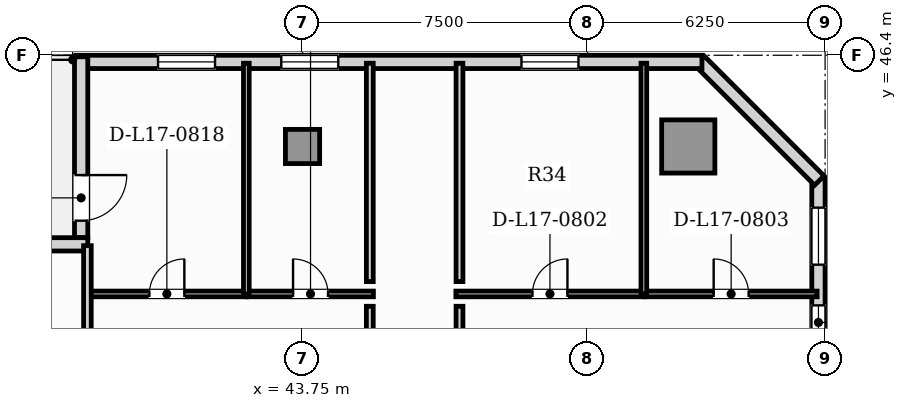
"""IFC4 building model, lengths in metres.
Left out: names, types, materials, properties, quantities, classifications, styles, units other than length and angle.
Written with IfcOpenShell. Run it as: python <this file> out.ifc"""

import sys

from ifc_helpers import new_model, si_unit, direction, frame, frame_2d, origin, origin_2d, place, context, subcontext, project, spatial, rectangle, hollow_rectangle, extrude, element, fill, save


model = new_model("IFC4")
c1 = context("Model", 3, precision=1e-05, world=origin(), true_north=direction((0.0, 1.0)))
c2 = subcontext(c1, "Body", "Model", "MODEL_VIEW")
j1 = project(units=[si_unit("LENGTHUNIT", "METRE"), si_unit("PLANEANGLEUNIT", "RADIAN")], contexts=[c1])
p1 = place(None, origin())
s1 = spatial("IfcSite", under=j1, at=p1, CompositionType="ELEMENT")
p2 = place(p1, origin())
s2 = spatial("IfcBuilding", under=s1, at=p2, CompositionType="ELEMENT")
p3 = place(p2, frame((0.0, 0.0, 72.15)))
s3 = spatial("IfcBuildingStorey", under=s2, at=p3, CompositionType="ELEMENT", Elevation=72.15)
p4 = place(p3, frame((53.9, 44.0, 0.0), z_axis=(0.0, 0.0, 1.0), x_axis=(1.0, 0.0, 0.0)))
e1 = element("IfcColumn", 1, at=p4, inside=s3, PredefinedType="USERDEFINED", context=c2, shape_type="SweptSolid", body=[
    extrude(hollow_rectangle(XDim=1.4, YDim=1.4, WallThickness=0.08, at=origin_2d()), origin(), (0.0, 0.0, 1.0), 3.85),
])
p5 = place(p3, frame((43.75, 44.0, 0.0), z_axis=(0.0, 0.0, 1.0), x_axis=(1.0, 0.0, 0.0)))
e2 = element("IfcColumn", 2, at=p5, inside=s3, PredefinedType="COLUMN", context=c2, shape_type="SweptSolid", body=[
    extrude(rectangle(XDim=0.9, YDim=0.9, at=origin_2d()), origin(), (0.0, 0.0, 1.0), 3.85),
])
p6 = place(p3, frame((57.325, 3.24, 0.0), z_axis=(0.0, 0.0, 1.0), x_axis=(0.0, 1.0, 0.0)))
e3 = element("IfcWall", 3, at=p6, inside=s3, PredefinedType="SOLIDWALL", context=c2, shape_type="SweptSolid", body=[
    extrude(rectangle(XDim=39.92, YDim=0.35, at=frame_2d((19.96, 0.0))), origin(), (0.0, 0.0, 1.0), 3.57),
])
p7 = place(p6, frame((35.68, 0.0, 0.95)))
e4 = element("IfcOpeningElement", 4, at=p7, cuts=e3, PredefinedType="OPENING", context=c2, shape_type="SweptSolid", body=[
    extrude(rectangle(XDim=0.9, YDim=1.5, at=frame_2d((0.45, 0.75))), frame((0.0, 0.185, 0.0), z_axis=(0.0, -1.0, 0.0), x_axis=(1.0, 0.0, 0.0)), (0.0, 0.0, 1.0), 0.37),
])
p8 = place(p6, frame((11.929, 0.0, 0.9)))
e5 = element("IfcOpeningElement", 5, at=p8, cuts=e3, PredefinedType="OPENING", context=c2, shape_type="SweptSolid", body=[
    extrude(rectangle(XDim=1.5, YDim=1.95, at=frame_2d((0.75, 0.975))), frame((0.0, 0.185, 0.0), z_axis=(0.0, -1.0, 0.0), x_axis=(1.0, 0.0, 0.0)), (0.0, 0.0, 1.0), 0.37),
])
p9 = place(p6, frame((24.354, 0.0, 0.9)))
e6 = element("IfcOpeningElement", 6, at=p9, cuts=e3, PredefinedType="OPENING", context=c2, shape_type="SweptSolid", body=[
    extrude(rectangle(XDim=1.5, YDim=1.95, at=frame_2d((0.75, 0.975))), frame((0.0, 0.185, 0.0), z_axis=(0.0, -1.0, 0.0), x_axis=(1.0, 0.0, 0.0)), (0.0, 0.0, 1.0), 0.37),
])
p10 = place(p6, frame((37.65, 0.0, 0.9)))
e7 = element("IfcOpeningElement", 7, at=p10, cuts=e3, PredefinedType="OPENING", context=c2, shape_type="SweptSolid", body=[
    extrude(rectangle(XDim=1.5, YDim=1.95, at=frame_2d((0.75, 0.975))), frame((0.0, 0.185, 0.0), z_axis=(0.0, -1.0, 0.0), x_axis=(1.0, 0.0, 0.0)), (0.0, 0.0, 1.0), 0.37),
])
p11 = place(p3, frame((57.348, 43.104, 0.0), z_axis=(0.0, 0.0, 1.0), x_axis=(-0.707079321262, 0.707134240044, 0.0)))
e8 = element("IfcWall", 8, at=p11, inside=s3, PredefinedType="SOLIDWALL", context=c2, shape_type="SweptSolid", body=[
    extrude(rectangle(XDim=4.446, YDim=0.35, at=frame_2d((2.223, 0.0))), origin(), (0.0, 0.0, 1.0), 3.57),
])
p12 = place(p3, frame((54.26, 46.225, 0.0), z_axis=(0.0, 0.0, 1.0), x_axis=(-1.0, 0.0, 0.0)))
e9 = element("IfcWall", 9, at=p12, inside=s3, PredefinedType="SOLIDWALL", context=c2, shape_type="SweptSolid", body=[
    extrude(rectangle(XDim=16.47, YDim=0.35, at=frame_2d((8.235, 0.0))), origin(), (0.0, 0.0, 1.0), 3.57),
])
p13 = place(p12, frame((3.25, 0.0, 0.9)))
e10 = element("IfcOpeningElement", 10, at=p13, cuts=e9, PredefinedType="OPENING", context=c2, shape_type="SweptSolid", body=[
    extrude(rectangle(XDim=1.5, YDim=1.95, at=frame_2d((0.75, 0.975))), frame((0.0, 0.185, 0.0), z_axis=(0.0, -1.0, 0.0), x_axis=(1.0, 0.0, 0.0)), (0.0, 0.0, 1.0), 0.37),
])
p14 = place(p12, frame((12.812, 0.0, 0.9)))
e11 = element("IfcOpeningElement", 11, at=p14, cuts=e9, PredefinedType="OPENING", context=c2, shape_type="SweptSolid", body=[
    extrude(rectangle(XDim=1.5, YDim=1.95, at=frame_2d((0.75, 0.975))), frame((0.0, 0.185, 0.0), z_axis=(0.0, -1.0, 0.0), x_axis=(1.0, 0.0, 0.0)), (0.0, 0.0, 1.0), 0.37),
])
p15 = place(p12, frame((9.569, 0.0, 0.9)))
e12 = element("IfcOpeningElement", 12, at=p15, cuts=e9, PredefinedType="OPENING", context=c2, shape_type="SweptSolid", body=[
    extrude(rectangle(XDim=1.5, YDim=1.95, at=frame_2d((0.75, 0.975))), frame((0.0, 0.185, 0.0), z_axis=(0.0, -1.0, 0.0), x_axis=(1.0, 0.0, 0.0)), (0.0, 0.0, 1.0), 0.37),
])
p16 = place(p3, frame((37.925, 46.36, 0.0), z_axis=(0.0, 0.0, 1.0), x_axis=(0.0, -1.0, 0.0)))
e13 = element("IfcWall", 13, at=p16, inside=s3, PredefinedType="SOLIDWALL", context=c2, shape_type="SweptSolid", body=[
    extrude(rectangle(XDim=4.76, YDim=0.35, at=frame_2d((2.38, 0.0))), origin(), (0.0, 0.0, 1.0), 3.57),
])
p17 = place(p16, frame((3.113, 0.0, 0.0)))
e14 = element("IfcOpeningElement", 14, at=p17, cuts=e13, PredefinedType="OPENING", context=c2, shape_type="SweptSolid", body=[
    extrude(rectangle(XDim=1.2, YDim=2.2, at=frame_2d((0.6, 1.1))), frame((0.0, 0.185, 0.0), z_axis=(0.0, -1.0, 0.0), x_axis=(1.0, 0.0, 0.0)), (0.0, 0.0, 1.0), 0.37),
])
p18 = place(p3, frame((38.1, 41.425, 0.0), z_axis=(0.0, 0.0, 1.0), x_axis=(-1.0, 0.0, 0.0)))
e15 = element("IfcWall", 15, at=p18, inside=s3, PredefinedType="SOLIDWALL", context=c2, shape_type="SweptSolid", body=[
    extrude(rectangle(XDim=18.7, YDim=0.35, at=frame_2d((9.35, 0.0))), origin(), (0.0, 0.0, 1.0), 3.57),
])
p19 = place(p18, frame((14.506, 0.0, 0.9)))
e16 = element("IfcOpeningElement", 16, at=p19, cuts=e15, PredefinedType="OPENING", context=c2, shape_type="SweptSolid", body=[
    extrude(rectangle(XDim=1.5, YDim=1.95, at=frame_2d((0.75, 0.975))), frame((0.0, 0.185, 0.0), z_axis=(0.0, -1.0, 0.0), x_axis=(1.0, 0.0, 0.0)), (0.0, 0.0, 1.0), 0.37),
])
p20 = place(p18, frame((10.514, 0.0, 0.9)))
e17 = element("IfcOpeningElement", 17, at=p20, cuts=e15, PredefinedType="OPENING", context=c2, shape_type="SweptSolid", body=[
    extrude(rectangle(XDim=1.5, YDim=1.95, at=frame_2d((0.75, 0.975))), frame((0.0, 0.185, 0.0), z_axis=(0.0, -1.0, 0.0), x_axis=(1.0, 0.0, 0.0)), (0.0, 0.0, 1.0), 0.37),
])
p21 = place(p18, frame((6.546, 0.0, 0.9)))
e18 = element("IfcOpeningElement", 18, at=p21, cuts=e15, PredefinedType="OPENING", context=c2, shape_type="SweptSolid", body=[
    extrude(rectangle(XDim=1.5, YDim=1.95, at=frame_2d((0.75, 0.975))), frame((0.0, 0.185, 0.0), z_axis=(0.0, -1.0, 0.0), x_axis=(1.0, 0.0, 0.0)), (0.0, 0.0, 1.0), 0.37),
])
p22 = place(p18, frame((2.554, 0.0, 0.9)))
e19 = element("IfcOpeningElement", 19, at=p22, cuts=e15, PredefinedType="OPENING", context=c2, shape_type="SweptSolid", body=[
    extrude(rectangle(XDim=1.5, YDim=1.95, at=frame_2d((0.75, 0.975))), frame((0.0, 0.185, 0.0), z_axis=(0.0, -1.0, 0.0), x_axis=(1.0, 0.0, 0.0)), (0.0, 0.0, 1.0), 0.37),
])
p23 = place(p3, frame((47.785, 40.12, 0.0), z_axis=(0.0, 0.0, 1.0), x_axis=(1.0, 0.0, 0.0)))
e20 = element("IfcWall", 20, at=p23, inside=s3, PredefinedType="PARTITIONING", context=c2, shape_type="SweptSolid", body=[
    extrude(rectangle(XDim=4.951, YDim=0.15, at=frame_2d((2.476, 0.0))), origin(), (0.0, 0.0, 1.0), 3.57),
])
p24 = place(p23, frame((2.016, 0.0, 0.0)))
e21 = element("IfcOpeningElement", 21, at=p24, cuts=e20, PredefinedType="OPENING", context=c2, shape_type="SweptSolid", body=[
    extrude(rectangle(XDim=0.92, YDim=2.1, at=frame_2d((0.46, 1.05))), frame((0.0, 0.085, 0.0), z_axis=(0.0, -1.0, 0.0), x_axis=(1.0, 0.0, 0.0)), (0.0, 0.0, 1.0), 0.17),
])
p25 = place(p3, frame((52.766, 40.12, 0.0), z_axis=(0.0, 0.0, 1.0), x_axis=(1.0, 0.0, 0.0)))
e22 = element("IfcWall", 22, at=p25, inside=s3, PredefinedType="PARTITIONING", context=c2, shape_type="SweptSolid", body=[
    extrude(rectangle(XDim=4.524, YDim=0.15, at=frame_2d((2.262, 0.0))), origin(), (0.0, 0.0, 1.0), 3.57),
])
p26 = place(p25, frame((1.802, 0.0, 0.0)))
e23 = element("IfcOpeningElement", 23, at=p26, cuts=e22, PredefinedType="OPENING", context=c2, shape_type="SweptSolid", body=[
    extrude(rectangle(XDim=0.92, YDim=2.1, at=frame_2d((0.46, 1.05))), frame((0.0, 0.085, 0.0), z_axis=(0.0, -1.0, 0.0), x_axis=(1.0, 0.0, 0.0)), (0.0, 0.0, 1.0), 0.17),
])
p27 = place(p3, frame((52.731, 40.115, 0.0), z_axis=(0.0, 0.0, 1.0), x_axis=(0.0, 1.0, 0.0)))
e24 = element("IfcWall", 24, at=p27, inside=s3, PredefinedType="PARTITIONING", context=c2, shape_type="SweptSolid", body=[
    extrude(rectangle(XDim=6.075, YDim=0.15, at=frame_2d((3.038, 0.0))), origin(), (0.0, 0.0, 1.0), 3.57),
])
p28 = place(p3, frame((38.085, 40.12, 0.0), z_axis=(0.0, 0.0, 1.0), x_axis=(1.0, 0.0, 0.0)))
e25 = element("IfcWall", 25, at=p28, inside=s3, PredefinedType="PARTITIONING", context=c2, shape_type="SweptSolid", body=[
    extrude(rectangle(XDim=4.191, YDim=0.15, at=frame_2d((2.096, 0.0))), origin(), (0.0, 0.0, 1.0), 3.57),
])
p29 = place(p28, frame((1.635, 0.0, 0.0)))
e26 = element("IfcOpeningElement", 26, at=p29, cuts=e25, PredefinedType="OPENING", context=c2, shape_type="SweptSolid", body=[
    extrude(rectangle(XDim=0.92, YDim=2.1, at=frame_2d((0.46, 1.05))), frame((0.0, 0.085, 0.0), z_axis=(0.0, -1.0, 0.0), x_axis=(1.0, 0.0, 0.0)), (0.0, 0.0, 1.0), 0.17),
])
p30 = place(p3, frame((42.306, 40.12, 0.0), z_axis=(0.0, 0.0, 1.0), x_axis=(1.0, 0.0, 0.0)))
e27 = element("IfcWall", 27, at=p30, inside=s3, PredefinedType="PARTITIONING", context=c2, shape_type="SweptSolid", body=[
    extrude(rectangle(XDim=3.309, YDim=0.15, at=frame_2d((1.654, 0.0))), origin(), (0.0, 0.0, 1.0), 3.57),
])
p31 = place(p30, frame((1.194, 0.0, 0.0)))
e28 = element("IfcOpeningElement", 28, at=p31, cuts=e27, PredefinedType="OPENING", context=c2, shape_type="SweptSolid", body=[
    extrude(rectangle(XDim=0.92, YDim=2.1, at=frame_2d((0.46, 1.05))), frame((0.0, 0.085, 0.0), z_axis=(0.0, -1.0, 0.0), x_axis=(1.0, 0.0, 0.0)), (0.0, 0.0, 1.0), 0.17),
])
p32 = place(p3, frame((38.09, 38.615, 0.0), z_axis=(0.0, 0.0, 1.0), x_axis=(0.0, 1.0, 0.0)))
e29 = element("IfcWall", 29, at=p32, inside=s3, PredefinedType="PARTITIONING", context=c2, shape_type="SweptSolid", body=[
    extrude(rectangle(XDim=2.775, YDim=0.2, at=frame_2d((1.387, 0.0))), origin(), (0.0, 0.0, 1.0), 3.57),
])
p33 = place(p3, frame((42.271, 40.115, 0.0), z_axis=(0.0, 0.0, 1.0), x_axis=(0.0, 1.0, 0.0)))
e30 = element("IfcWall", 30, at=p33, inside=s3, PredefinedType="PARTITIONING", context=c2, shape_type="SweptSolid", body=[
    extrude(rectangle(XDim=6.075, YDim=0.15, at=frame_2d((3.038, 0.0))), origin(), (0.0, 0.0, 1.0), 3.57),
])
p34 = place(p3, frame((47.88, 38.945, 0.0), z_axis=(0.0, 0.0, 1.0), x_axis=(0.0, 1.0, 0.0)))
e31 = element("IfcWall", 31, at=p34, inside=s3, PredefinedType="PARTITIONING", context=c2, shape_type="SweptSolid", body=[
    extrude(rectangle(XDim=0.85, YDim=0.18, at=frame_2d((0.425, 0.0))), origin(), (0.0, 0.0, 1.0), 3.57),
])
p35 = place(p3, frame((47.88, 40.445, 0.0), z_axis=(0.0, 0.0, 1.0), x_axis=(0.0, 1.0, 0.0)))
e32 = element("IfcWall", 32, at=p35, inside=s3, PredefinedType="PARTITIONING", context=c2, shape_type="SweptSolid", body=[
    extrude(rectangle(XDim=5.745, YDim=0.18, at=frame_2d((2.873, 0.0))), origin(), (0.0, 0.0, 1.0), 3.57),
])
p36 = place(p3, frame((45.52, 39.795, 0.0), z_axis=(0.0, 0.0, 1.0), x_axis=(0.0, -1.0, 0.0)))
e33 = element("IfcWall", 33, at=p36, inside=s3, PredefinedType="PARTITIONING", context=c2, shape_type="SweptSolid", body=[
    extrude(rectangle(XDim=0.85, YDim=0.18, at=frame_2d((0.425, 0.0))), origin(), (0.0, 0.0, 1.0), 3.57),
])
p37 = place(p3, frame((45.52, 46.19, 0.0), z_axis=(0.0, 0.0, 1.0), x_axis=(0.0, -1.0, 0.0)))
e34 = element("IfcWall", 34, at=p37, inside=s3, PredefinedType="PARTITIONING", context=c2, shape_type="SweptSolid", body=[
    extrude(rectangle(XDim=5.745, YDim=0.18, at=frame_2d((2.873, 0.0))), origin(), (0.0, 0.0, 1.0), 3.57),
])
p38 = place(p17, frame((1.2, 0.0, 0.0), z_axis=(0.0, 0.0, 1.0), x_axis=(-1.0, 0.0, 0.0)))
e35 = element("IfcDoor", 35, at=p38, inside=s3, OperationType="SINGLE_SWING_RIGHT", PredefinedType="DOOR", context=c2, shape_type="SweptSolid", body=[
    extrude(rectangle(XDim=1.2, YDim=2.2, at=frame_2d((0.6, 1.1))), frame((0.0, 0.025, 0.0), z_axis=(0.0, -1.0, 0.0), x_axis=(1.0, 0.0, 0.0)), (0.0, 0.0, 1.0), 0.05),
])
fill(e14, e35)
p39 = place(p7, origin())
e36 = element("IfcWindow", 36, at=p39, inside=s3, PartitioningType="SINGLE_PANEL", PredefinedType="WINDOW", context=c2, shape_type="SweptSolid", body=[
    extrude(rectangle(XDim=0.9, YDim=1.5, at=frame_2d((0.45, 0.75))), frame((0.0, 0.03, 0.0), z_axis=(0.0, -1.0, 0.0), x_axis=(1.0, 0.0, 0.0)), (0.0, 0.0, 1.0), 0.06),
])
fill(e4, e36)
p40 = place(p13, origin())
e37 = element("IfcWindow", 37, at=p40, inside=s3, PartitioningType="SINGLE_PANEL", PredefinedType="WINDOW", context=c2, shape_type="SweptSolid", body=[
    extrude(rectangle(XDim=1.5, YDim=1.95, at=frame_2d((0.75, 0.975))), frame((0.0, 0.03, 0.0), z_axis=(0.0, -1.0, 0.0), x_axis=(1.0, 0.0, 0.0)), (0.0, 0.0, 1.0), 0.06),
])
fill(e10, e37)
p41 = place(p10, origin())
e38 = element("IfcWindow", 38, at=p41, inside=s3, PartitioningType="SINGLE_PANEL", PredefinedType="WINDOW", context=c2, shape_type="SweptSolid", body=[
    extrude(rectangle(XDim=1.5, YDim=1.95, at=frame_2d((0.75, 0.975))), frame((0.0, 0.03, 0.0), z_axis=(0.0, -1.0, 0.0), x_axis=(1.0, 0.0, 0.0)), (0.0, 0.0, 1.0), 0.06),
])
fill(e7, e38)
p42 = place(p14, origin())
e39 = element("IfcWindow", 39, at=p42, inside=s3, PartitioningType="SINGLE_PANEL", PredefinedType="WINDOW", context=c2, shape_type="SweptSolid", body=[
    extrude(rectangle(XDim=1.5, YDim=1.95, at=frame_2d((0.75, 0.975))), frame((0.0, 0.03, 0.0), z_axis=(0.0, -1.0, 0.0), x_axis=(1.0, 0.0, 0.0)), (0.0, 0.0, 1.0), 0.06),
])
fill(e11, e39)
p43 = place(p15, origin())
e40 = element("IfcWindow", 40, at=p43, inside=s3, PartitioningType="SINGLE_PANEL", PredefinedType="WINDOW", context=c2, shape_type="SweptSolid", body=[
    extrude(rectangle(XDim=1.5, YDim=1.95, at=frame_2d((0.75, 0.975))), frame((0.0, 0.03, 0.0), z_axis=(0.0, -1.0, 0.0), x_axis=(1.0, 0.0, 0.0)), (0.0, 0.0, 1.0), 0.06),
])
fill(e12, e40)
p44 = place(p24, origin())
e41 = element("IfcDoor", 41, at=p44, inside=s3, OperationType="SINGLE_SWING_RIGHT", PredefinedType="DOOR", context=c2, shape_type="SweptSolid", body=[
    extrude(rectangle(XDim=0.92, YDim=2.1, at=frame_2d((0.46, 1.05))), frame((0.0, 0.025, 0.0), z_axis=(0.0, -1.0, 0.0), x_axis=(1.0, 0.0, 0.0)), (0.0, 0.0, 1.0), 0.05),
])
fill(e21, e41)
p45 = place(p26, origin())
e42 = element("IfcDoor", 42, at=p45, inside=s3, OperationType="SINGLE_SWING_LEFT", PredefinedType="DOOR", context=c2, shape_type="SweptSolid", body=[
    extrude(rectangle(XDim=0.92, YDim=2.1, at=frame_2d((0.46, 1.05))), frame((0.0, 0.025, 0.0), z_axis=(0.0, -1.0, 0.0), x_axis=(1.0, 0.0, 0.0)), (0.0, 0.0, 1.0), 0.05),
])
fill(e23, e42)
p46 = place(p29, origin())
e43 = element("IfcDoor", 43, at=p46, inside=s3, OperationType="SINGLE_SWING_RIGHT", PredefinedType="DOOR", context=c2, shape_type="SweptSolid", body=[
    extrude(rectangle(XDim=0.92, YDim=2.1, at=frame_2d((0.46, 1.05))), frame((0.0, 0.025, 0.0), z_axis=(0.0, -1.0, 0.0), x_axis=(1.0, 0.0, 0.0)), (0.0, 0.0, 1.0), 0.05),
])
fill(e26, e43)
p47 = place(p31, origin())
e44 = element("IfcDoor", 44, at=p47, inside=s3, OperationType="SINGLE_SWING_LEFT", PredefinedType="DOOR", context=c2, shape_type="SweptSolid", body=[
    extrude(rectangle(XDim=0.92, YDim=2.1, at=frame_2d((0.46, 1.05))), frame((0.0, 0.025, 0.0), z_axis=(0.0, -1.0, 0.0), x_axis=(1.0, 0.0, 0.0)), (0.0, 0.0, 1.0), 0.05),
])
fill(e28, e44)
save(model, sys.argv[1])
